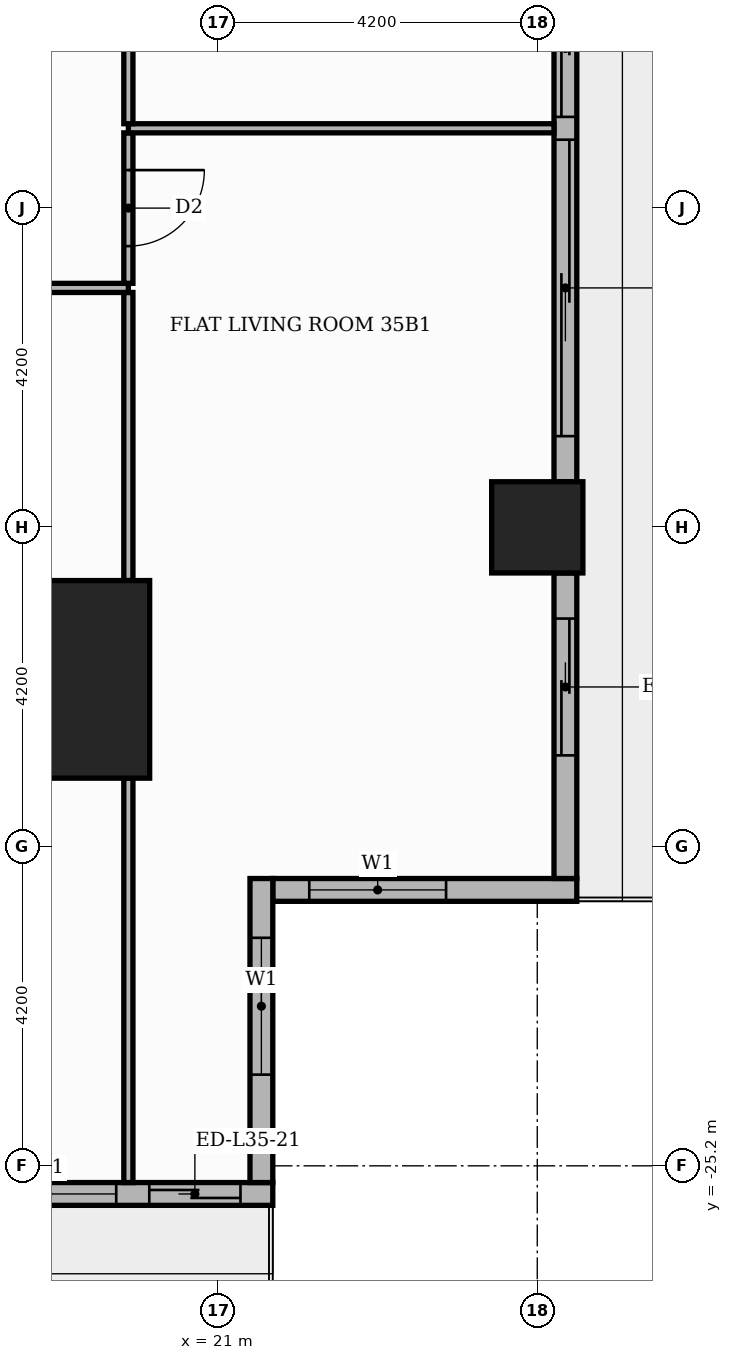
"""IFC4 building model, lengths in metres.
Left out: names, types, materials, properties, quantities, classifications, styles, units other than length and angle.
Written with IfcOpenShell. Run it as: python <this file> out.ifc"""

import sys

from ifc_helpers import new_model, si_unit, direction, frame, frame_2d, origin, origin_2d, place, context, subcontext, project, spatial, rectangle, extrude, element, fill, save


model = new_model("IFC4")
c1 = context("Model", 3, precision=1e-05, world=origin(), true_north=direction((0.0, 1.0)))
c2 = subcontext(c1, "Body", "Model", "MODEL_VIEW")
j1 = project(units=[si_unit("LENGTHUNIT", "METRE"), si_unit("PLANEANGLEUNIT", "RADIAN")], contexts=[c1])
p1 = place(None, origin())
s1 = spatial("IfcSite", under=j1, at=p1, CompositionType="ELEMENT")
p2 = place(p1, origin())
s2 = spatial("IfcBuilding", under=s1, at=p2, CompositionType="ELEMENT")
p3 = place(p2, frame((0.0, 0.0, 149.4)))
s3 = spatial("IfcBuildingStorey", under=s2, at=p3, CompositionType="ELEMENT", Elevation=149.4)
p4 = place(p3, frame((18.8, -18.8, 0.0), z_axis=(0.0, 0.0, 1.0), x_axis=(1.0, 0.0, 0.0)))
e1 = element("IfcColumn", 1, at=p4, inside=s3, PredefinedType="COLUMN", context=c2, shape_type="SweptSolid", body=[
    extrude(rectangle(XDim=2.6, YDim=2.6, at=origin_2d()), origin(), (0.0, 0.0, 1.0), 3.9),
])
p5 = place(p3, frame((25.2, -16.8, 0.0), z_axis=(0.0, 0.0, 1.0), x_axis=(1.0, 0.0, 0.0)))
e2 = element("IfcColumn", 2, at=p5, inside=s3, PredefinedType="COLUMN", context=c2, shape_type="SweptSolid", body=[
    extrude(rectangle(XDim=1.2, YDim=1.2, at=origin_2d()), origin(), (0.0, 0.0, 1.0), 3.9),
])
p6 = place(p3, frame((21.72, -21.57, 0.0), z_axis=(0.0, 0.0, 1.0), x_axis=(1.0, 0.0, 0.0)))
e3 = element("IfcWall", 3, at=p6, inside=s3, PredefinedType="STANDARD", context=c2, shape_type="SweptSolid", body=[
    extrude(rectangle(XDim=4.0, YDim=0.3, at=frame_2d((2.0, 0.0))), origin(), (0.0, 0.0, 1.0), 3.48),
])
p7 = place(p6, frame((0.48, 0.0, 0.9)))
e4 = element("IfcOpeningElement", 4, at=p7, cuts=e3, PredefinedType="OPENING", context=c2, shape_type="SweptSolid", body=[
    extrude(rectangle(XDim=1.8, YDim=2.1, at=frame_2d((0.9, 1.05))), frame((0.0, 0.16, 0.0), z_axis=(0.0, -1.0, 0.0), x_axis=(1.0, 0.0, 0.0)), (0.0, 0.0, 1.0), 0.32),
])
p8 = place(p3, frame((25.57, -21.42, 0.0), z_axis=(0.0, 0.0, 1.0), x_axis=(0.0, 1.0, 0.0)))
e5 = element("IfcWall", 5, at=p8, inside=s3, PredefinedType="STANDARD", context=c2, shape_type="SweptSolid", body=[
    extrude(rectangle(XDim=4.02, YDim=0.3, at=frame_2d((2.01, 0.0))), origin(), (0.0, 0.0, 1.0), 3.48),
])
p9 = place(p8, frame((1.62, 0.0, 0.0)))
e6 = element("IfcOpeningElement", 6, at=p9, cuts=e5, PredefinedType="OPENING", context=c2, shape_type="SweptSolid", body=[
    extrude(rectangle(XDim=1.8, YDim=2.4, at=frame_2d((0.9, 1.2))), frame((0.0, 0.16, 0.0), z_axis=(0.0, -1.0, 0.0), x_axis=(1.0, 0.0, 0.0)), (0.0, 0.0, 1.0), 0.32),
])
p10 = place(p3, frame((25.57, -16.2, 0.0), z_axis=(0.0, 0.0, 1.0), x_axis=(0.0, 1.0, 0.0)))
e7 = element("IfcWall", 7, at=p10, inside=s3, PredefinedType="STANDARD", context=c2, shape_type="SweptSolid", body=[
    extrude(rectangle(XDim=7.2, YDim=0.3, at=frame_2d((3.6, 0.0))), origin(), (0.0, 0.0, 1.0), 3.48),
])
p11 = place(p10, frame((0.6, 0.0, 0.0)))
e8 = element("IfcOpeningElement", 8, at=p11, cuts=e7, PredefinedType="OPENING", context=c2, shape_type="SweptSolid", body=[
    extrude(rectangle(XDim=3.9, YDim=2.4, at=frame_2d((1.95, 1.2))), frame((0.0, 0.16, 0.0), z_axis=(0.0, -1.0, 0.0), x_axis=(1.0, 0.0, 0.0)), (0.0, 0.0, 1.0), 0.32),
])
p12 = place(p10, frame((4.8, 0.0, 0.0)))
e9 = element("IfcOpeningElement", 9, at=p12, cuts=e7, PredefinedType="OPENING", context=c2, shape_type="SweptSolid", body=[
    extrude(rectangle(XDim=1.8, YDim=2.4, at=frame_2d((0.9, 1.2))), frame((0.0, 0.16, 0.0), z_axis=(0.0, -1.0, 0.0), x_axis=(1.0, 0.0, 0.0)), (0.0, 0.0, 1.0), 0.32),
])
p13 = place(p3, frame((17.4, -25.57, 0.0), z_axis=(0.0, 0.0, 1.0), x_axis=(1.0, 0.0, 0.0)))
e10 = element("IfcWall", 10, at=p13, inside=s3, PredefinedType="STANDARD", context=c2, shape_type="SweptSolid", body=[
    extrude(rectangle(XDim=4.32, YDim=0.3, at=frame_2d((2.16, 0.0))), origin(), (0.0, 0.0, 1.0), 3.48),
])
p14 = place(p13, frame((2.695, 0.0, 0.0)))
e11 = element("IfcOpeningElement", 11, at=p14, cuts=e10, PredefinedType="OPENING", context=c2, shape_type="SweptSolid", body=[
    extrude(rectangle(XDim=1.2, YDim=2.4, at=frame_2d((0.6, 1.2))), frame((0.0, 0.16, 0.0), z_axis=(0.0, -1.0, 0.0), x_axis=(1.0, 0.0, 0.0)), (0.0, 0.0, 1.0), 0.32),
])
p15 = place(p13, frame((0.46, 0.0, 0.9)))
e12 = element("IfcOpeningElement", 12, at=p15, cuts=e10, PredefinedType="OPENING", context=c2, shape_type="SweptSolid", body=[
    extrude(rectangle(XDim=1.8, YDim=2.1, at=frame_2d((0.9, 1.05))), frame((0.0, 0.16, 0.0), z_axis=(0.0, -1.0, 0.0), x_axis=(1.0, 0.0, 0.0)), (0.0, 0.0, 1.0), 0.32),
])
p16 = place(p3, frame((21.57, -25.42, 0.0), z_axis=(0.0, 0.0, 1.0), x_axis=(0.0, 1.0, 0.0)))
e13 = element("IfcWall", 13, at=p16, inside=s3, PredefinedType="STANDARD", context=c2, shape_type="SweptSolid", body=[
    extrude(rectangle(XDim=4.0, YDim=0.3, at=frame_2d((2.0, 0.0))), origin(), (0.0, 0.0, 1.0), 3.48),
])
p17 = place(p16, frame((1.42, 0.0, 0.9)))
e14 = element("IfcOpeningElement", 14, at=p17, cuts=e13, PredefinedType="OPENING", context=c2, shape_type="SweptSolid", body=[
    extrude(rectangle(XDim=1.8, YDim=2.1, at=frame_2d((0.9, 1.05))), frame((0.0, 0.16, 0.0), z_axis=(0.0, -1.0, 0.0), x_axis=(1.0, 0.0, 0.0)), (0.0, 0.0, 1.0), 0.32),
])
p18 = place(p3, frame((19.82, -25.42, 0.0), z_axis=(0.0, 0.0, 1.0), x_axis=(0.0, 1.0, 0.0)))
e15 = element("IfcWall", 15, at=p18, inside=s3, PredefinedType="PARTITIONING", context=c2, shape_type="SweptSolid", body=[
    extrude(rectangle(XDim=5.32, YDim=0.12, at=frame_2d((2.66, 0.0))), origin(), (0.0, 0.0, 1.0), 3.48),
])
p19 = place(p3, frame((19.82, -17.5, 0.0), z_axis=(0.0, 0.0, 1.0), x_axis=(0.0, 1.0, 0.0)))
e16 = element("IfcWall", 16, at=p19, inside=s3, PredefinedType="PARTITIONING", context=c2, shape_type="SweptSolid", body=[
    extrude(rectangle(XDim=3.79, YDim=0.12, at=frame_2d((1.895, 0.0))), origin(), (0.0, 0.0, 1.0), 3.48),
])
p20 = place(p3, frame((13.65, -13.65, 0.0), z_axis=(0.0, 0.0, 1.0), x_axis=(1.0, 0.0, 0.0)))
e17 = element("IfcWall", 17, at=p20, inside=s3, PredefinedType="PARTITIONING", context=c2, shape_type="SweptSolid", body=[
    extrude(rectangle(XDim=6.17, YDim=0.12, at=frame_2d((3.085, 0.0))), origin(), (0.0, 0.0, 1.0), 3.48),
])
p21 = place(p20, frame((2.635, 0.0, 0.0)))
e18 = element("IfcOpeningElement", 18, at=p21, cuts=e17, PredefinedType="OPENING", context=c2, shape_type="SweptSolid", body=[
    extrude(rectangle(XDim=0.9, YDim=2.1, at=frame_2d((0.45, 1.05))), frame((0.0, 0.07, 0.0), z_axis=(0.0, -1.0, 0.0), x_axis=(1.0, 0.0, 0.0)), (0.0, 0.0, 1.0), 0.14),
])
p22 = place(p3, frame((19.82, -13.59, 0.0), z_axis=(0.0, 0.0, 1.0), x_axis=(0.0, 1.0, 0.0)))
e19 = element("IfcWall", 19, at=p22, inside=s3, PredefinedType="PARTITIONING", context=c2, shape_type="SweptSolid", body=[
    extrude(rectangle(XDim=1.98, YDim=0.12, at=frame_2d((0.99, 0.0))), origin(), (0.0, 0.0, 1.0), 3.48),
])
p23 = place(p22, frame((0.49, 0.0, 0.0)))
e20 = element("IfcOpeningElement", 20, at=p23, cuts=e19, PredefinedType="OPENING", context=c2, shape_type="SweptSolid", body=[
    extrude(rectangle(XDim=1.0, YDim=2.1, at=frame_2d((0.5, 1.05))), frame((0.0, 0.07, 0.0), z_axis=(0.0, -1.0, 0.0), x_axis=(1.0, 0.0, 0.0)), (0.0, 0.0, 1.0), 0.14),
])
p24 = place(p3, frame((19.82, -11.55, 0.0), z_axis=(0.0, 0.0, 1.0), x_axis=(1.0, 0.0, 0.0)))
e21 = element("IfcWall", 21, at=p24, inside=s3, PredefinedType="PARTITIONING", context=c2, shape_type="SweptSolid", body=[
    extrude(rectangle(XDim=5.6, YDim=0.12, at=frame_2d((2.8, 0.0))), origin(), (0.0, 0.0, 1.0), 3.48),
])
p25 = place(p3, frame((19.82, -11.49, 0.0), z_axis=(0.0, 0.0, 1.0), x_axis=(0.0, 1.0, 0.0)))
e22 = element("IfcWall", 22, at=p25, inside=s3, PredefinedType="PARTITIONING", context=c2, shape_type="SweptSolid", body=[
    extrude(rectangle(XDim=6.18, YDim=0.12, at=frame_2d((3.09, 0.0))), origin(), (0.0, 0.0, 1.0), 3.48),
])
p26 = place(p25, frame((2.64, 0.0, 0.0)))
e23 = element("IfcOpeningElement", 23, at=p26, cuts=e22, PredefinedType="OPENING", context=c2, shape_type="SweptSolid", body=[
    extrude(rectangle(XDim=0.9, YDim=2.1, at=frame_2d((0.45, 1.05))), frame((0.0, 0.07, 0.0), z_axis=(0.0, -1.0, 0.0), x_axis=(1.0, 0.0, 0.0)), (0.0, 0.0, 1.0), 0.14),
])
p27 = place(p7, origin())
e24 = element("IfcWindow", 24, at=p27, inside=s3, PartitioningType="SINGLE_PANEL", PredefinedType="WINDOW", context=c2, shape_type="SweptSolid", body=[
    extrude(rectangle(XDim=1.8, YDim=2.1, at=frame_2d((0.9, 1.05))), frame((0.0, 0.03, 0.0), z_axis=(0.0, -1.0, 0.0), x_axis=(1.0, 0.0, 0.0)), (0.0, 0.0, 1.0), 0.06),
])
fill(e4, e24)
p28 = place(p9, origin())
e25 = element("IfcDoor", 25, at=p28, inside=s3, OperationType="SLIDING_TO_RIGHT", PredefinedType="DOOR", context=c2, shape_type="SweptSolid", body=[
    extrude(rectangle(XDim=1.8, YDim=2.4, at=frame_2d((0.9, 1.2))), frame((0.0, 0.025, 0.0), z_axis=(0.0, -1.0, 0.0), x_axis=(1.0, 0.0, 0.0)), (0.0, 0.0, 1.0), 0.05),
])
fill(e6, e25)
p29 = place(p11, origin())
e26 = element("IfcDoor", 26, at=p29, inside=s3, OperationType="SLIDING_TO_LEFT", PredefinedType="DOOR", context=c2, shape_type="SweptSolid", body=[
    extrude(rectangle(XDim=3.9, YDim=2.4, at=frame_2d((1.95, 1.2))), frame((0.0, 0.025, 0.0), z_axis=(0.0, -1.0, 0.0), x_axis=(1.0, 0.0, 0.0)), (0.0, 0.0, 1.0), 0.05),
])
fill(e8, e26)
p30 = place(p12, origin())
e27 = element("IfcDoor", 27, at=p30, inside=s3, OperationType="SLIDING_TO_RIGHT", PredefinedType="DOOR", context=c2, shape_type="SweptSolid", body=[
    extrude(rectangle(XDim=1.8, YDim=2.4, at=frame_2d((0.9, 1.2))), frame((0.0, 0.025, 0.0), z_axis=(0.0, -1.0, 0.0), x_axis=(1.0, 0.0, 0.0)), (0.0, 0.0, 1.0), 0.05),
])
fill(e9, e27)
p31 = place(p14, origin())
e28 = element("IfcDoor", 28, at=p31, inside=s3, OperationType="SLIDING_TO_LEFT", PredefinedType="DOOR", context=c2, shape_type="SweptSolid", body=[
    extrude(rectangle(XDim=1.2, YDim=2.4, at=frame_2d((0.6, 1.2))), frame((0.0, 0.025, 0.0), z_axis=(0.0, -1.0, 0.0), x_axis=(1.0, 0.0, 0.0)), (0.0, 0.0, 1.0), 0.05),
])
fill(e11, e28)
p32 = place(p15, origin())
e29 = element("IfcWindow", 29, at=p32, inside=s3, PartitioningType="SINGLE_PANEL", PredefinedType="WINDOW", context=c2, shape_type="SweptSolid", body=[
    extrude(rectangle(XDim=1.8, YDim=2.1, at=frame_2d((0.9, 1.05))), frame((0.0, 0.03, 0.0), z_axis=(0.0, -1.0, 0.0), x_axis=(1.0, 0.0, 0.0)), (0.0, 0.0, 1.0), 0.06),
])
fill(e12, e29)
p33 = place(p17, origin())
e30 = element("IfcWindow", 30, at=p33, inside=s3, PartitioningType="SINGLE_PANEL", PredefinedType="WINDOW", context=c2, shape_type="SweptSolid", body=[
    extrude(rectangle(XDim=1.8, YDim=2.1, at=frame_2d((0.9, 1.05))), frame((0.0, 0.03, 0.0), z_axis=(0.0, -1.0, 0.0), x_axis=(1.0, 0.0, 0.0)), (0.0, 0.0, 1.0), 0.06),
])
fill(e14, e30)
p34 = place(p23, frame((1.0, 0.0, 0.0), z_axis=(0.0, 0.0, 1.0), x_axis=(-1.0, 0.0, 0.0)))
e31 = element("IfcDoor", 31, at=p34, inside=s3, OperationType="SINGLE_SWING_RIGHT", PredefinedType="DOOR", context=c2, shape_type="SweptSolid", body=[
    extrude(rectangle(XDim=1.0, YDim=2.1, at=frame_2d((0.5, 1.05))), frame((0.0, 0.025, 0.0), z_axis=(0.0, -1.0, 0.0), x_axis=(1.0, 0.0, 0.0)), (0.0, 0.0, 1.0), 0.05),
])
fill(e20, e31)
save(model, sys.argv[1])
